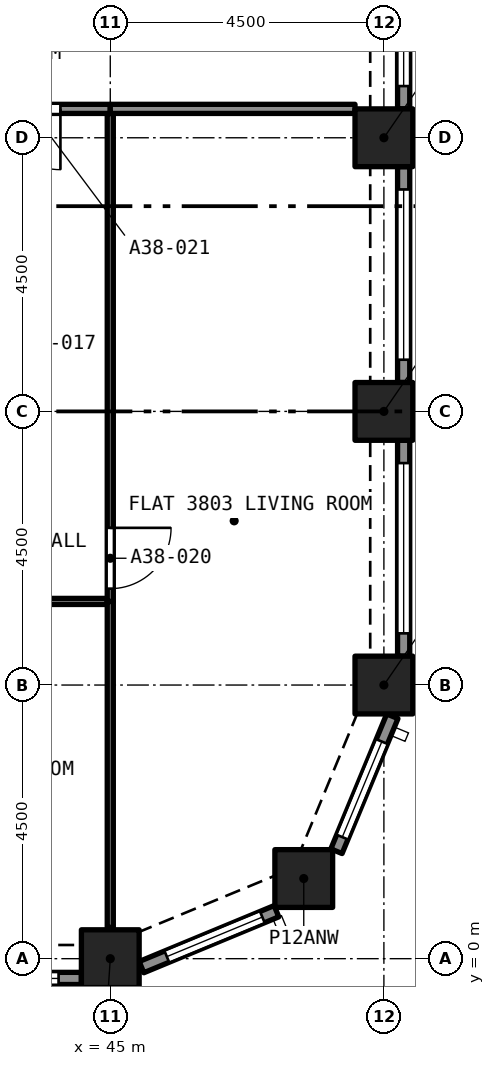
"""IFC4 building model, lengths in metres.
Left out: names, types, materials, properties, quantities, classifications, styles, units other than length and angle.
Written with IfcOpenShell. Run it as: python <this file> out.ifc"""

import sys

from ifc_helpers import new_model, si_unit, direction, frame, frame_2d, origin, origin_2d, place, context, subcontext, project, spatial, rectangle, extrude, element, fill, save


model = new_model("IFC4")
c1 = context("Model", 3, precision=1e-05, world=origin(), true_north=direction((0.0, 1.0)))
c2 = subcontext(c1, "Body", "Model", "MODEL_VIEW")
j1 = project(units=[si_unit("LENGTHUNIT", "METRE"), si_unit("PLANEANGLEUNIT", "RADIAN")], contexts=[c1])
p1 = place(None, origin())
s1 = spatial("IfcSite", under=j1, at=p1, CompositionType="ELEMENT")
p2 = place(p1, origin())
s2 = spatial("IfcBuilding", under=s1, at=p2, CompositionType="ELEMENT")
p3 = place(p2, frame((0.0, 0.0, 136.6)))
s3 = spatial("IfcBuildingStorey", under=s2, at=p3, CompositionType="ELEMENT", Elevation=136.6)
for number, where, z_axis, x_axis in (
    (1, (45.0, 0.0, 0.0), (0.0, 0.0, 1.0), (1.0, 0.0, 0.0)),
    (2, (48.182, 1.318, 0.0), (0.0, 0.0, 1.0), (1.0, 0.0, 0.0)),
    (3, (49.5, 4.5, 0.0), (0.0, 0.0, 1.0), (1.0, 0.0, 0.0)),
    (4, (49.5, 9.0, 0.0), (0.0, 0.0, 1.0), (1.0, 0.0, 0.0)),
    (5, (49.5, 13.5, 0.0), (0.0, 0.0, 1.0), (1.0, 0.0, 0.0)),
):
    element("IfcColumn", number, at=place(p3, frame(where, z_axis=z_axis, x_axis=x_axis)), inside=s3, PredefinedType="COLUMN", context=c2, shape_type="SweptSolid", body=[
        extrude(rectangle(XDim=0.95, YDim=0.95, at=origin_2d()), origin(), (0.0, 0.0, 1.0), 3.2),
    ])
p4 = place(p3, frame((44.525, -0.325, 0.0), z_axis=(0.0, 0.0, 1.0), x_axis=(-1.0, 0.0, 0.0)))
e6 = element("IfcWall", 6, at=p4, inside=s3, PredefinedType="SOLIDWALL", context=c2, shape_type="SweptSolid", body=[
    extrude(rectangle(XDim=3.55, YDim=0.2, at=frame_2d((1.775, 0.0))), origin(), (0.0, 0.0, 1.0), 3.2),
])
p5 = place(p4, frame((0.375, 0.0, 0.45)))
e7 = element("IfcOpeningElement", 7, at=p5, cuts=e6, PredefinedType="OPENING", context=c2, shape_type="SweptSolid", body=[
    extrude(rectangle(XDim=2.8, YDim=1.95, at=frame_2d((1.4, 0.975))), frame((0.0, 0.11, 0.0), z_axis=(0.0, -1.0, 0.0), x_axis=(1.0, 0.0, 0.0)), (0.0, 0.0, 1.0), 0.22),
])
p6 = place(p3, frame((47.733, 0.78, 0.0), z_axis=(0.0, 0.0, 1.0), x_axis=(-0.923880599843, -0.382680855588, 0.0)))
e8 = element("IfcWall", 8, at=p6, inside=s3, PredefinedType="SOLIDWALL", context=c2, shape_type="SweptSolid", body=[
    extrude(rectangle(XDim=2.403, YDim=0.2, at=frame_2d((1.201, 0.0))), origin(), (0.0, 0.0, 1.0), 3.2),
])
p7 = place(p6, frame((0.251, 0.0, 0.45)))
e9 = element("IfcOpeningElement", 9, at=p7, cuts=e8, PredefinedType="OPENING", context=c2, shape_type="SweptSolid", body=[
    extrude(rectangle(XDim=1.7, YDim=1.95, at=frame_2d((0.85, 0.975))), frame((0.0, 0.11, 0.0), z_axis=(0.0, -1.0, 0.0), x_axis=(1.0, 0.0, 0.0)), (0.0, 0.0, 1.0), 0.22),
])
p8 = place(p3, frame((49.639, 3.987, 0.0), z_axis=(0.0, 0.0, 1.0), x_axis=(-0.382680855588, -0.923880599843, 0.0)))
e10 = element("IfcWall", 10, at=p8, inside=s3, PredefinedType="SOLIDWALL", context=c2, shape_type="SweptSolid", body=[
    extrude(rectangle(XDim=2.403, YDim=0.2, at=frame_2d((1.201, 0.0))), origin(), (0.0, 0.0, 1.0), 3.2),
])
p9 = place(p8, frame((0.451, 0.0, 0.45)))
e11 = element("IfcOpeningElement", 11, at=p9, cuts=e10, PredefinedType="OPENING", context=c2, shape_type="SweptSolid", body=[
    extrude(rectangle(XDim=1.7, YDim=1.95, at=frame_2d((0.85, 0.975))), frame((0.0, 0.11, 0.0), z_axis=(0.0, -1.0, 0.0), x_axis=(1.0, 0.0, 0.0)), (0.0, 0.0, 1.0), 0.22),
])
p10 = place(p3, frame((49.825, 8.525, 0.0), z_axis=(0.0, 0.0, 1.0), x_axis=(0.0, -1.0, 0.0)))
e12 = element("IfcWall", 12, at=p10, inside=s3, PredefinedType="SOLIDWALL", context=c2, shape_type="SweptSolid", body=[
    extrude(rectangle(XDim=3.55, YDim=0.2, at=frame_2d((1.775, 0.0))), origin(), (0.0, 0.0, 1.0), 3.2),
])
p11 = place(p10, frame((0.375, 0.0, 0.45)))
e13 = element("IfcOpeningElement", 13, at=p11, cuts=e12, PredefinedType="OPENING", context=c2, shape_type="SweptSolid", body=[
    extrude(rectangle(XDim=2.8, YDim=1.95, at=frame_2d((1.4, 0.975))), frame((0.0, 0.11, 0.0), z_axis=(0.0, -1.0, 0.0), x_axis=(1.0, 0.0, 0.0)), (0.0, 0.0, 1.0), 0.22),
])
p12 = place(p3, frame((49.825, 13.025, 0.0), z_axis=(0.0, 0.0, 1.0), x_axis=(0.0, -1.0, 0.0)))
e14 = element("IfcWall", 14, at=p12, inside=s3, PredefinedType="SOLIDWALL", context=c2, shape_type="SweptSolid", body=[
    extrude(rectangle(XDim=3.55, YDim=0.2, at=frame_2d((1.775, 0.0))), origin(), (0.0, 0.0, 1.0), 3.2),
])
p13 = place(p12, frame((0.375, 0.0, 0.45)))
e15 = element("IfcOpeningElement", 15, at=p13, cuts=e14, PredefinedType="OPENING", context=c2, shape_type="SweptSolid", body=[
    extrude(rectangle(XDim=2.8, YDim=1.95, at=frame_2d((1.4, 0.975))), frame((0.0, 0.11, 0.0), z_axis=(0.0, -1.0, 0.0), x_axis=(1.0, 0.0, 0.0)), (0.0, 0.0, 1.0), 0.22),
])
p14 = place(p3, frame((49.825, 17.525, 0.0), z_axis=(0.0, 0.0, 1.0), x_axis=(0.0, -1.0, 0.0)))
e16 = element("IfcWall", 16, at=p14, inside=s3, PredefinedType="SOLIDWALL", context=c2, shape_type="SweptSolid", body=[
    extrude(rectangle(XDim=3.55, YDim=0.2, at=frame_2d((1.775, 0.0))), origin(), (0.0, 0.0, 1.0), 3.2),
])
p15 = place(p14, frame((0.375, 0.0, 0.45)))
e17 = element("IfcOpeningElement", 17, at=p15, cuts=e16, PredefinedType="OPENING", context=c2, shape_type="SweptSolid", body=[
    extrude(rectangle(XDim=2.8, YDim=1.95, at=frame_2d((1.4, 0.975))), frame((0.0, 0.11, 0.0), z_axis=(0.0, -1.0, 0.0), x_axis=(1.0, 0.0, 0.0)), (0.0, 0.0, 1.0), 0.22),
])
p16 = place(p3, frame((44.95, 5.875, 0.0), z_axis=(0.0, 0.0, 1.0), x_axis=(-1.0, 0.0, 0.0)))
e18 = element("IfcWall", 18, at=p16, inside=s3, PredefinedType="PARTITIONING", context=c2, shape_type="SweptSolid", body=[
    extrude(rectangle(XDim=4.35, YDim=0.1, at=frame_2d((2.175, 0.0))), origin(), (0.0, 0.0, 1.0), 2.9),
])
p17 = place(p16, frame((1.75, 0.0, 0.0)))
e19 = element("IfcOpeningElement", 19, at=p17, cuts=e18, PredefinedType="OPENING", context=c2, shape_type="SweptSolid", body=[
    extrude(rectangle(XDim=0.9, YDim=2.1, at=frame_2d((0.45, 1.05))), frame((0.0, 0.06, 0.0), z_axis=(0.0, -1.0, 0.0), x_axis=(1.0, 0.0, 0.0)), (0.0, 0.0, 1.0), 0.12),
])
p18 = place(p3, frame((45.0, 0.514, 0.0), z_axis=(0.0, 0.0, 1.0), x_axis=(0.0, 1.0, 0.0)))
e20 = element("IfcWall", 20, at=p18, inside=s3, PredefinedType="PARTITIONING", context=c2, shape_type="SweptSolid", body=[
    extrude(rectangle(XDim=5.361, YDim=0.1, at=frame_2d((2.68, 0.0))), origin(), (0.0, 0.0, 1.0), 2.9),
])
p19 = place(p3, frame((45.0, 13.9, 0.0), z_axis=(0.0, 0.0, 1.0), x_axis=(0.0, -1.0, 0.0)))
e21 = element("IfcWall", 21, at=p19, inside=s3, PredefinedType="PARTITIONING", context=c2, shape_type="SweptSolid", body=[
    extrude(rectangle(XDim=8.025, YDim=0.1, at=frame_2d((4.012, 0.0))), origin(), (0.0, 0.0, 1.0), 2.9),
])
p20 = place(p19, frame((6.815, 0.0, 0.0)))
e22 = element("IfcOpeningElement", 22, at=p20, cuts=e21, PredefinedType="OPENING", context=c2, shape_type="SweptSolid", body=[
    extrude(rectangle(XDim=1.0, YDim=2.1, at=frame_2d((0.5, 1.05))), frame((0.0, 0.06, 0.0), z_axis=(0.0, -1.0, 0.0), x_axis=(1.0, 0.0, 0.0)), (0.0, 0.0, 1.0), 0.12),
])
p21 = place(p3, frame((45.0, 13.975, 0.0), z_axis=(0.0, 0.0, 1.0), x_axis=(-1.0, 0.0, 0.0)))
e23 = element("IfcWall", 23, at=p21, inside=s3, PredefinedType="PARTITIONING", context=c2, shape_type="SweptSolid", body=[
    extrude(rectangle(XDim=1.95, YDim=0.15, at=frame_2d((0.975, 0.0))), origin(), (0.0, 0.0, 1.0), 2.9),
])
p22 = place(p21, frame((0.82, 0.0, 0.0)))
e24 = element("IfcOpeningElement", 24, at=p22, cuts=e23, PredefinedType="OPENING", context=c2, shape_type="SweptSolid", body=[
    extrude(rectangle(XDim=1.0, YDim=2.1, at=frame_2d((0.5, 1.05))), frame((0.0, 0.085, 0.0), z_axis=(0.0, -1.0, 0.0), x_axis=(1.0, 0.0, 0.0)), (0.0, 0.0, 1.0), 0.17),
])
p23 = place(p3, frame((45.0, 13.975, 0.0), z_axis=(0.0, 0.0, 1.0), x_axis=(1.0, 0.0, 0.0)))
e25 = element("IfcWall", 25, at=p23, inside=s3, PredefinedType="PARTITIONING", context=c2, shape_type="SweptSolid", body=[
    extrude(rectangle(XDim=4.025, YDim=0.15, at=frame_2d((2.012, 0.0))), origin(), (0.0, 0.0, 1.0), 2.9),
])
p24 = place(p5, origin())
e26 = element("IfcWindow", 26, at=p24, inside=s3, PartitioningType="SINGLE_PANEL", PredefinedType="WINDOW", context=c2, shape_type="SweptSolid", body=[
    extrude(rectangle(XDim=2.8, YDim=1.95, at=frame_2d((1.4, 0.975))), frame((0.0, 0.03, 0.0), z_axis=(0.0, -1.0, 0.0), x_axis=(1.0, 0.0, 0.0)), (0.0, 0.0, 1.0), 0.06),
])
fill(e7, e26)
p25 = place(p7, origin())
e27 = element("IfcWindow", 27, at=p25, inside=s3, PartitioningType="SINGLE_PANEL", PredefinedType="WINDOW", context=c2, shape_type="SweptSolid", body=[
    extrude(rectangle(XDim=1.7, YDim=1.95, at=frame_2d((0.85, 0.975))), frame((0.0, 0.03, 0.0), z_axis=(0.0, -1.0, 0.0), x_axis=(1.0, 0.0, 0.0)), (0.0, 0.0, 1.0), 0.06),
])
fill(e9, e27)
p26 = place(p9, origin())
e28 = element("IfcWindow", 28, at=p26, inside=s3, PartitioningType="SINGLE_PANEL", PredefinedType="WINDOW", context=c2, shape_type="SweptSolid", body=[
    extrude(rectangle(XDim=1.7, YDim=1.95, at=frame_2d((0.85, 0.975))), frame((0.0, 0.03, 0.0), z_axis=(0.0, -1.0, 0.0), x_axis=(1.0, 0.0, 0.0)), (0.0, 0.0, 1.0), 0.06),
])
fill(e11, e28)
p27 = place(p11, origin())
e29 = element("IfcWindow", 29, at=p27, inside=s3, PartitioningType="SINGLE_PANEL", PredefinedType="WINDOW", context=c2, shape_type="SweptSolid", body=[
    extrude(rectangle(XDim=2.8, YDim=1.95, at=frame_2d((1.4, 0.975))), frame((0.0, 0.03, 0.0), z_axis=(0.0, -1.0, 0.0), x_axis=(1.0, 0.0, 0.0)), (0.0, 0.0, 1.0), 0.06),
])
fill(e13, e29)
p28 = place(p13, origin())
e30 = element("IfcWindow", 30, at=p28, inside=s3, PartitioningType="SINGLE_PANEL", PredefinedType="WINDOW", context=c2, shape_type="SweptSolid", body=[
    extrude(rectangle(XDim=2.8, YDim=1.95, at=frame_2d((1.4, 0.975))), frame((0.0, 0.03, 0.0), z_axis=(0.0, -1.0, 0.0), x_axis=(1.0, 0.0, 0.0)), (0.0, 0.0, 1.0), 0.06),
])
fill(e15, e30)
p29 = place(p15, origin())
e31 = element("IfcWindow", 31, at=p29, inside=s3, PartitioningType="SINGLE_PANEL", PredefinedType="WINDOW", context=c2, shape_type="SweptSolid", body=[
    extrude(rectangle(XDim=2.8, YDim=1.95, at=frame_2d((1.4, 0.975))), frame((0.0, 0.03, 0.0), z_axis=(0.0, -1.0, 0.0), x_axis=(1.0, 0.0, 0.0)), (0.0, 0.0, 1.0), 0.06),
])
fill(e17, e31)
p30 = place(p20, origin())
e32 = element("IfcDoor", 32, at=p30, inside=s3, OperationType="SINGLE_SWING_RIGHT", PredefinedType="DOOR", context=c2, shape_type="SweptSolid", body=[
    extrude(rectangle(XDim=1.0, YDim=2.1, at=frame_2d((0.5, 1.05))), frame((0.0, 0.025, 0.0), z_axis=(0.0, -1.0, 0.0), x_axis=(1.0, 0.0, 0.0)), (0.0, 0.0, 1.0), 0.05),
])
fill(e22, e32)
p31 = place(p22, origin())
e33 = element("IfcDoor", 33, at=p31, inside=s3, OperationType="SINGLE_SWING_RIGHT", PredefinedType="DOOR", context=c2, shape_type="SweptSolid", body=[
    extrude(rectangle(XDim=1.0, YDim=2.1, at=frame_2d((0.5, 1.05))), frame((0.0, 0.025, 0.0), z_axis=(0.0, -1.0, 0.0), x_axis=(1.0, 0.0, 0.0)), (0.0, 0.0, 1.0), 0.05),
])
fill(e24, e33)
save(model, sys.argv[1])
